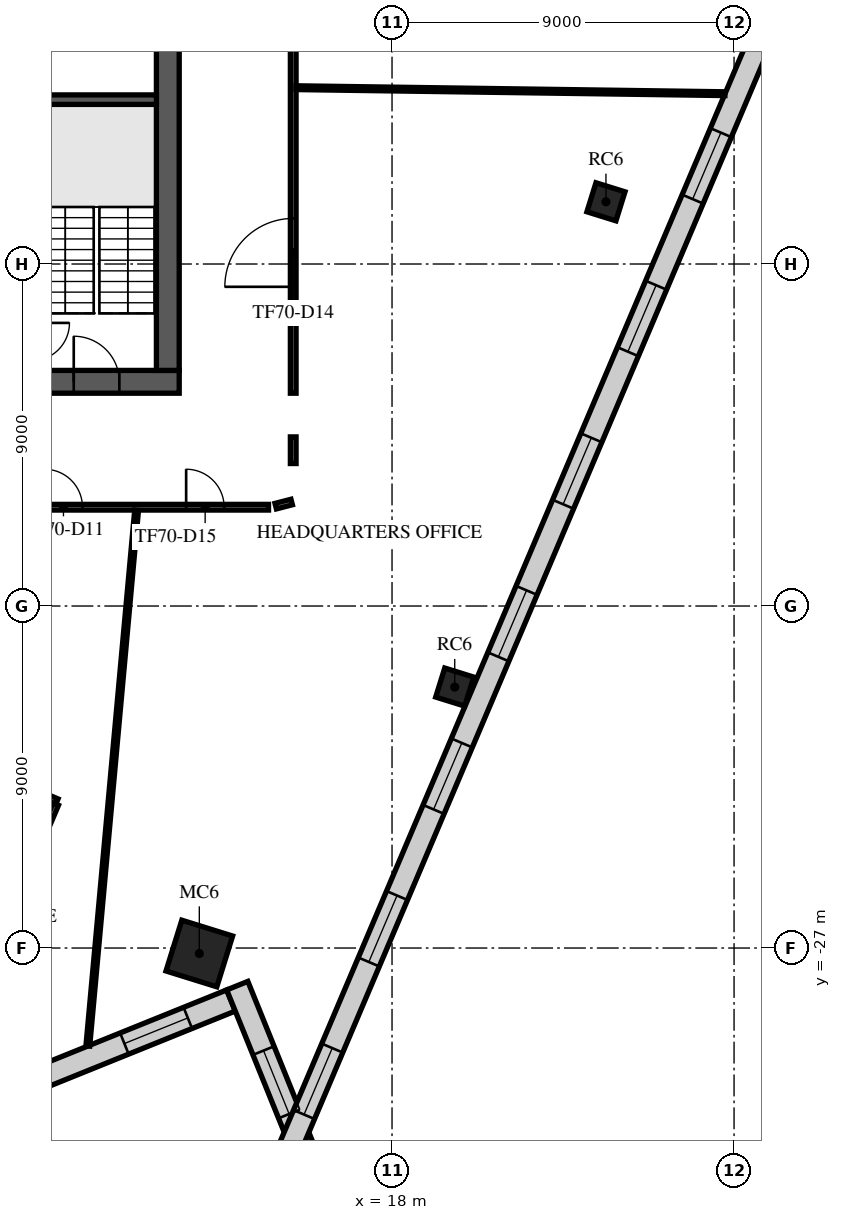
"""IFC4 building model, lengths in metres.
Left out: names, types, materials, properties, quantities, classifications, styles, units other than length and angle.
Written with IfcOpenShell. Run it as: python <this file> out.ifc"""

import sys

from ifc_helpers import new_model, si_unit, direction, frame, frame_2d, origin, origin_2d, place, context, subcontext, project, spatial, rectangle, extrude, element, fill, save


model = new_model("IFC4")
c1 = context("Model", 3, precision=1e-05, world=origin(), true_north=direction((0.0, 1.0)))
c2 = subcontext(c1, "Body", "Model", "MODEL_VIEW")
j1 = project(units=[si_unit("LENGTHUNIT", "METRE"), si_unit("PLANEANGLEUNIT", "RADIAN")], contexts=[c1])
p1 = place(None, origin())
s1 = spatial("IfcSite", under=j1, at=p1, CompositionType="ELEMENT")
p2 = place(p1, origin())
s2 = spatial("IfcBuilding", under=s1, at=p2, CompositionType="ELEMENT")
p3 = place(p2, frame((0.0, 0.0, 296.5)))
s3 = spatial("IfcBuildingStorey", under=s2, at=p3, CompositionType="ELEMENT", Elevation=296.5)
p4 = place(p3, frame((12.929, -27.144, -0.35), z_axis=(0.0, 0.0, 1.0), x_axis=(0.297503182032, 0.954720826567, 0.0)))
e1 = element("IfcColumn", 1, at=p4, inside=s3, PredefinedType="COLUMN", context=c2, shape_type="SweptSolid", body=[
    extrude(rectangle(XDim=1.4, YDim=1.4, at=origin_2d()), origin(), (0.0, 0.0, 1.0), 4.35),
])
for number, where, z_axis, x_axis in (
    (2, (19.65, -20.133, -0.35), (0.0, 0.0, 1.0), (0.298, 0.955, 0.0)),
    (3, (23.629, -7.363, -0.35), (0.0, 0.0, 1.0), (0.298, 0.955, 0.0)),
):
    element("IfcColumn", number, at=place(p3, frame(where, z_axis=z_axis, x_axis=x_axis)), inside=s3, PredefinedType="COLUMN", context=c2, shape_type="SweptSolid", body=[
        extrude(rectangle(XDim=0.8, YDim=0.8, at=origin_2d()), origin(), (0.0, 0.0, 1.0), 4.35),
    ])
p5 = place(p3, frame((-12.4, -12.1, 0.0), z_axis=(0.0, 0.0, 1.0), x_axis=(1.0, 0.0, 0.0)))
e4 = element("IfcWall", 4, at=p5, inside=s3, PredefinedType="SHEAR", context=c2, shape_type="SweptSolid", body=[
    extrude(rectangle(XDim=24.8, YDim=0.6, at=frame_2d((12.4, 0.0))), origin(), (0.0, 0.0, 1.0), 3.65),
])
p6 = place(p5, frame((7.3, 0.0, 0.0)))
e5 = element("IfcOpeningElement", 5, at=p6, cuts=e4, PredefinedType="OPENING", context=c2, shape_type="SweptSolid", body=[
    extrude(rectangle(XDim=2.0, YDim=2.1, at=frame_2d((1.0, 1.05))), frame((0.0, 0.31, 0.0), z_axis=(0.0, -1.0, 0.0), x_axis=(1.0, 0.0, 0.0)), (0.0, 0.0, 1.0), 0.62),
])
p7 = place(p5, frame((17.425, 0.0, 0.0)))
e6 = element("IfcOpeningElement", 6, at=p7, cuts=e4, PredefinedType="OPENING", context=c2, shape_type="SweptSolid", body=[
    extrude(rectangle(XDim=1.2, YDim=2.1, at=frame_2d((0.6, 1.05))), frame((0.0, 0.31, 0.0), z_axis=(0.0, -1.0, 0.0), x_axis=(1.0, 0.0, 0.0)), (0.0, 0.0, 1.0), 0.62),
])
p8 = place(p5, frame((1.575, 0.0, 0.0)))
e7 = element("IfcOpeningElement", 7, at=p8, cuts=e4, PredefinedType="OPENING", context=c2, shape_type="SweptSolid", body=[
    extrude(rectangle(XDim=1.2, YDim=2.1, at=frame_2d((0.6, 1.05))), frame((0.0, 0.31, 0.0), z_axis=(0.0, -1.0, 0.0), x_axis=(1.0, 0.0, 0.0)), (0.0, 0.0, 1.0), 0.62),
])
p9 = place(p5, frame((22.025, 0.0, 0.0)))
e8 = element("IfcOpeningElement", 8, at=p9, cuts=e4, PredefinedType="OPENING", context=c2, shape_type="SweptSolid", body=[
    extrude(rectangle(XDim=1.2, YDim=2.1, at=frame_2d((0.6, 1.05))), frame((0.0, 0.31, 0.0), z_axis=(0.0, -1.0, 0.0), x_axis=(1.0, 0.0, 0.0)), (0.0, 0.0, 1.0), 0.62),
])
p10 = place(p3, frame((12.1, -11.8, 0.0), z_axis=(0.0, 0.0, 1.0), x_axis=(0.0, 1.0, 0.0)))
e9 = element("IfcWall", 9, at=p10, inside=s3, PredefinedType="SHEAR", context=c2, shape_type="SweptSolid", body=[
    extrude(rectangle(XDim=23.6, YDim=0.6, at=frame_2d((11.8, 0.0))), origin(), (0.0, 0.0, 1.0), 3.65),
])
p11 = place(p10, frame((10.6, 0.0, 0.0)))
e10 = element("IfcOpeningElement", 10, at=p11, cuts=e9, PredefinedType="OPENING", context=c2, shape_type="SweptSolid", body=[
    extrude(rectangle(XDim=2.4, YDim=2.4, at=frame_2d((1.2, 1.2))), frame((0.0, 0.31, 0.0), z_axis=(0.0, -1.0, 0.0), x_axis=(1.0, 0.0, 0.0)), (0.0, 0.0, 1.0), 0.62),
])
p12 = place(p3, frame((8.65, -4.675, 0.0), z_axis=(0.0, 0.0, 1.0), x_axis=(1.0, 0.0, 0.0)))
e11 = element("IfcWall", 11, at=p12, inside=s3, PredefinedType="SOLIDWALL", context=c2, shape_type="SweptSolid", body=[
    extrude(rectangle(XDim=3.15, YDim=0.25, at=frame_2d((1.575, 0.0))), origin(), (0.0, 0.0, 1.0), 3.65),
])
p13 = place(p3, frame((5.881, -31.565, 0.0), z_axis=(0.0, 0.0, 1.0), x_axis=(0.927187551636, 0.37459744272, 0.0)))
e12 = element("IfcWall", 12, at=p13, inside=s3, PredefinedType="STANDARD", context=c2, shape_type="SweptSolid", body=[
    extrude(rectangle(XDim=8.5, YDim=0.6, at=frame_2d((4.25, 0.0))), origin(), (0.0, 0.0, 1.0), 3.65),
])
p14 = place(p13, frame((1.225, 0.0, 0.9)))
e13 = element("IfcOpeningElement", 13, at=p14, cuts=e12, PredefinedType="OPENING", context=c2, shape_type="SweptSolid", body=[
    extrude(rectangle(XDim=1.8, YDim=2.1, at=frame_2d((0.9, 1.05))), frame((0.0, 0.31, 0.0), z_axis=(0.0, -1.0, 0.0), x_axis=(1.0, 0.0, 0.0)), (0.0, 0.0, 1.0), 0.62),
])
p15 = place(p13, frame((5.475, 0.0, 0.9)))
e14 = element("IfcOpeningElement", 14, at=p15, cuts=e12, PredefinedType="OPENING", context=c2, shape_type="SweptSolid", body=[
    extrude(rectangle(XDim=1.8, YDim=2.1, at=frame_2d((0.9, 1.05))), frame((0.0, 0.31, 0.0), z_axis=(0.0, -1.0, 0.0), x_axis=(1.0, 0.0, 0.0)), (0.0, 0.0, 1.0), 0.62),
])
p16 = place(p3, frame((13.928, -27.99, 0.0), z_axis=(0.0, 0.0, 1.0), x_axis=(0.374576238335, -0.927196118238, 0.0)))
e15 = element("IfcWall", 15, at=p16, inside=s3, PredefinedType="STANDARD", context=c2, shape_type="SweptSolid", body=[
    extrude(rectangle(XDim=4.886, YDim=0.6, at=frame_2d((2.443, 0.0))), origin(), (0.0, 0.0, 1.0), 3.65),
])
p17 = place(p16, frame((1.843, 0.0, 0.9)))
e16 = element("IfcOpeningElement", 16, at=p17, cuts=e15, PredefinedType="OPENING", context=c2, shape_type="SweptSolid", body=[
    extrude(rectangle(XDim=1.8, YDim=2.1, at=frame_2d((0.9, 1.05))), frame((0.0, 0.31, 0.0), z_axis=(0.0, -1.0, 0.0), x_axis=(1.0, 0.0, 0.0)), (0.0, 0.0, 1.0), 0.62),
])
p18 = place(p3, frame((15.204, -32.515, 0.0), z_axis=(0.0, 0.0, 1.0), x_axis=(0.390728997462, 0.920505758017, 0.0)))
e17 = element("IfcWall", 17, at=p18, inside=s3, PredefinedType="STANDARD", context=c2, shape_type="SweptSolid", body=[
    extrude(rectangle(XDim=47.979, YDim=0.6, at=frame_2d((23.99, 0.0))), origin(), (0.0, 0.0, 1.0), 3.65),
])
p19 = place(p18, frame((1.231, 0.0, 0.9)))
e18 = element("IfcOpeningElement", 18, at=p19, cuts=e17, PredefinedType="OPENING", context=c2, shape_type="SweptSolid", body=[
    extrude(rectangle(XDim=1.9, YDim=2.1, at=frame_2d((0.95, 1.05))), frame((0.0, 0.31, 0.0), z_axis=(0.0, -1.0, 0.0), x_axis=(1.0, 0.0, 0.0)), (0.0, 0.0, 1.0), 0.62),
])
p20 = place(p18, frame((5.593, 0.0, 0.9)))
e19 = element("IfcOpeningElement", 19, at=p20, cuts=e17, PredefinedType="OPENING", context=c2, shape_type="SweptSolid", body=[
    extrude(rectangle(XDim=1.9, YDim=2.1, at=frame_2d((0.95, 1.05))), frame((0.0, 0.31, 0.0), z_axis=(0.0, -1.0, 0.0), x_axis=(1.0, 0.0, 0.0)), (0.0, 0.0, 1.0), 0.62),
])
p21 = place(p18, frame((9.954, 0.0, 0.9)))
e20 = element("IfcOpeningElement", 20, at=p21, cuts=e17, PredefinedType="OPENING", context=c2, shape_type="SweptSolid", body=[
    extrude(rectangle(XDim=1.9, YDim=2.1, at=frame_2d((0.95, 1.05))), frame((0.0, 0.31, 0.0), z_axis=(0.0, -1.0, 0.0), x_axis=(1.0, 0.0, 0.0)), (0.0, 0.0, 1.0), 0.62),
])
p22 = place(p18, frame((14.316, 0.0, 0.9)))
e21 = element("IfcOpeningElement", 21, at=p22, cuts=e17, PredefinedType="OPENING", context=c2, shape_type="SweptSolid", body=[
    extrude(rectangle(XDim=1.9, YDim=2.1, at=frame_2d((0.95, 1.05))), frame((0.0, 0.31, 0.0), z_axis=(0.0, -1.0, 0.0), x_axis=(1.0, 0.0, 0.0)), (0.0, 0.0, 1.0), 0.62),
])
p23 = place(p18, frame((18.678, 0.0, 0.9)))
e22 = element("IfcOpeningElement", 22, at=p23, cuts=e17, PredefinedType="OPENING", context=c2, shape_type="SweptSolid", body=[
    extrude(rectangle(XDim=1.9, YDim=2.1, at=frame_2d((0.95, 1.05))), frame((0.0, 0.31, 0.0), z_axis=(0.0, -1.0, 0.0), x_axis=(1.0, 0.0, 0.0)), (0.0, 0.0, 1.0), 0.62),
])
p24 = place(p18, frame((23.04, 0.0, 0.9)))
e23 = element("IfcOpeningElement", 23, at=p24, cuts=e17, PredefinedType="OPENING", context=c2, shape_type="SweptSolid", body=[
    extrude(rectangle(XDim=1.9, YDim=2.1, at=frame_2d((0.95, 1.05))), frame((0.0, 0.31, 0.0), z_axis=(0.0, -1.0, 0.0), x_axis=(1.0, 0.0, 0.0)), (0.0, 0.0, 1.0), 0.62),
])
p25 = place(p18, frame((27.401, 0.0, 0.9)))
e24 = element("IfcOpeningElement", 24, at=p25, cuts=e17, PredefinedType="OPENING", context=c2, shape_type="SweptSolid", body=[
    extrude(rectangle(XDim=1.9, YDim=2.1, at=frame_2d((0.95, 1.05))), frame((0.0, 0.31, 0.0), z_axis=(0.0, -1.0, 0.0), x_axis=(1.0, 0.0, 0.0)), (0.0, 0.0, 1.0), 0.62),
])
p26 = place(p18, frame((31.763, 0.0, 0.9)))
e25 = element("IfcOpeningElement", 25, at=p26, cuts=e17, PredefinedType="OPENING", context=c2, shape_type="SweptSolid", body=[
    extrude(rectangle(XDim=1.9, YDim=2.1, at=frame_2d((0.95, 1.05))), frame((0.0, 0.31, 0.0), z_axis=(0.0, -1.0, 0.0), x_axis=(1.0, 0.0, 0.0)), (0.0, 0.0, 1.0), 0.62),
])
p27 = place(p18, frame((36.125, 0.0, 0.9)))
e26 = element("IfcOpeningElement", 26, at=p27, cuts=e17, PredefinedType="OPENING", context=c2, shape_type="SweptSolid", body=[
    extrude(rectangle(XDim=1.9, YDim=2.1, at=frame_2d((0.95, 1.05))), frame((0.0, 0.31, 0.0), z_axis=(0.0, -1.0, 0.0), x_axis=(1.0, 0.0, 0.0)), (0.0, 0.0, 1.0), 0.62),
])
p28 = place(p18, frame((40.487, 0.0, 0.9)))
e27 = element("IfcOpeningElement", 27, at=p28, cuts=e17, PredefinedType="OPENING", context=c2, shape_type="SweptSolid", body=[
    extrude(rectangle(XDim=1.9, YDim=2.1, at=frame_2d((0.95, 1.05))), frame((0.0, 0.31, 0.0), z_axis=(0.0, -1.0, 0.0), x_axis=(1.0, 0.0, 0.0)), (0.0, 0.0, 1.0), 0.62),
])
p29 = place(p18, frame((44.848, 0.0, 0.9)))
e28 = element("IfcOpeningElement", 28, at=p29, cuts=e17, PredefinedType="OPENING", context=c2, shape_type="SweptSolid", body=[
    extrude(rectangle(XDim=1.9, YDim=2.1, at=frame_2d((0.95, 1.05))), frame((0.0, 0.31, 0.0), z_axis=(0.0, -1.0, 0.0), x_axis=(1.0, 0.0, 0.0)), (0.0, 0.0, 1.0), 0.62),
])
p30 = place(p3, frame((0.193, -19.329, 0.0), z_axis=(0.0, 0.0, 1.0), x_axis=(0.92050877494, -0.390721889914, 0.0)))
e29 = element("IfcWall", 29, at=p30, inside=s3, PredefinedType="PARTITIONING", context=c2, shape_type="SweptSolid", body=[
    extrude(rectangle(XDim=9.766, YDim=0.15, at=frame_2d((4.883, 0.0))), origin(), (0.0, 0.0, 1.0), 3.25),
])
p31 = place(p3, frame((1.304, -15.4, 0.0), z_axis=(0.0, 0.0, 1.0), x_axis=(1.0, 0.0, 0.0)))
e30 = element("IfcWall", 30, at=p31, inside=s3, PredefinedType="PARTITIONING", context=c2, shape_type="SweptSolid", body=[
    extrude(rectangle(XDim=13.446, YDim=0.15, at=frame_2d((6.723, 0.0))), origin(), (0.0, 0.0, 1.0), 3.25),
])
p32 = place(p31, frame((7.55, 0.0, 0.0)))
e31 = element("IfcOpeningElement", 31, at=p32, cuts=e30, PredefinedType="OPENING", context=c2, shape_type="SweptSolid", body=[
    extrude(rectangle(XDim=1.0, YDim=2.1, at=frame_2d((0.5, 1.05))), frame((0.0, 0.085, 0.0), z_axis=(0.0, -1.0, 0.0), x_axis=(1.0, 0.0, 0.0)), (0.0, 0.0, 1.0), 0.17),
])
p33 = place(p31, frame((11.278, 0.0, 0.0)))
e32 = element("IfcOpeningElement", 32, at=p33, cuts=e30, PredefinedType="OPENING", context=c2, shape_type="SweptSolid", body=[
    extrude(rectangle(XDim=1.0, YDim=2.1, at=frame_2d((0.5, 1.05))), frame((0.0, 0.085, 0.0), z_axis=(0.0, -1.0, 0.0), x_axis=(1.0, 0.0, 0.0)), (0.0, 0.0, 1.0), 0.17),
])
p34 = place(p3, frame((8.274, -25.285, 0.0), z_axis=(0.0, 0.0, 1.0), x_axis=(0.390878666815, 0.920442213194, 0.0)))
e33 = element("IfcWall", 33, at=p34, inside=s3, PredefinedType="PARTITIONING", context=c2, shape_type="SweptSolid", body=[
    extrude(rectangle(XDim=2.25, YDim=0.15, at=frame_2d((1.125, 0.0))), origin(), (0.0, 0.0, 1.0), 3.25),
])
p35 = place(p3, frame((15.36, -15.263, 0.0), z_axis=(0.0, 0.0, 1.0), x_axis=(-0.968229060736, -0.250064963452, 0.0)))
e34 = element("IfcWall", 34, at=p35, inside=s3, PredefinedType="PARTITIONING", context=c2, shape_type="SweptSolid", body=[
    extrude(rectangle(XDim=0.435, YDim=0.15, at=frame_2d((0.217, 0.0))), origin(), (0.0, 0.0, 1.0), 3.25),
])
p36 = place(p3, frame((15.4, -14.25, 0.0), z_axis=(0.0, 0.0, 1.0), x_axis=(0.0, 1.0, 0.0)))
e35 = element("IfcWall", 35, at=p36, inside=s3, PredefinedType="PARTITIONING", context=c2, shape_type="SweptSolid", body=[
    extrude(rectangle(XDim=0.7, YDim=0.15, at=frame_2d((0.35, 0.0))), origin(), (0.0, 0.0, 1.0), 3.65),
])
p37 = place(p3, frame((15.4, -12.4, 0.0), z_axis=(0.0, 0.0, 1.0), x_axis=(0.0, 1.0, 0.0)))
e36 = element("IfcWall", 36, at=p37, inside=s3, PredefinedType="PARTITIONING", context=c2, shape_type="SweptSolid", body=[
    extrude(rectangle(XDim=24.725, YDim=0.15, at=frame_2d((12.362, 0.0))), origin(), (0.0, 0.0, 1.0), 3.25),
])
p38 = place(p37, frame((2.8, 0.0, 0.0)))
e37 = element("IfcOpeningElement", 37, at=p38, cuts=e36, PredefinedType="OPENING", context=c2, shape_type="SweptSolid", body=[
    extrude(rectangle(XDim=1.8, YDim=2.1, at=frame_2d((0.9, 1.05))), frame((0.0, 0.085, 0.0), z_axis=(0.0, -1.0, 0.0), x_axis=(1.0, 0.0, 0.0)), (0.0, 0.0, 1.0), 0.17),
])
p39 = place(p37, frame((10.84, 0.0, 0.0)))
e38 = element("IfcOpeningElement", 38, at=p39, cuts=e36, PredefinedType="OPENING", context=c2, shape_type="SweptSolid", body=[
    extrude(rectangle(XDim=1.8, YDim=2.1, at=frame_2d((0.9, 1.05))), frame((0.0, 0.085, 0.0), z_axis=(0.0, -1.0, 0.0), x_axis=(1.0, 0.0, 0.0)), (0.0, 0.0, 1.0), 0.17),
])
p40 = place(p37, frame((17.59, 0.0, 0.0)))
e39 = element("IfcOpeningElement", 39, at=p40, cuts=e36, PredefinedType="OPENING", context=c2, shape_type="SweptSolid", body=[
    extrude(rectangle(XDim=1.0, YDim=2.1, at=frame_2d((0.5, 1.05))), frame((0.0, 0.085, 0.0), z_axis=(0.0, -1.0, 0.0), x_axis=(1.0, 0.0, 0.0)), (0.0, 0.0, 1.0), 0.17),
])
p41 = place(p37, frame((20.086, 0.0, 0.0)))
e40 = element("IfcOpeningElement", 40, at=p41, cuts=e36, PredefinedType="OPENING", context=c2, shape_type="SweptSolid", body=[
    extrude(rectangle(XDim=1.8, YDim=2.1, at=frame_2d((0.9, 1.05))), frame((0.0, 0.085, 0.0), z_axis=(0.0, -1.0, 0.0), x_axis=(1.0, 0.0, 0.0)), (0.0, 0.0, 1.0), 0.17),
])
p42 = place(p3, frame((9.995, -29.577, 0.0), z_axis=(0.0, 0.0, 1.0), x_axis=(0.090666368484, 0.995881323063, 0.0)))
e41 = element("IfcWall", 41, at=p42, inside=s3, PredefinedType="PARTITIONING", context=c2, shape_type="SweptSolid", body=[
    extrude(rectangle(XDim=14.156, YDim=0.1, at=frame_2d((7.078, 0.0))), origin(), (0.0, 0.0, 1.0), 3.65),
])
p43 = place(p3, frame((15.476, -4.36, 0.0), z_axis=(0.0, 0.0, 1.0), x_axis=(0.999902345391, -0.013974966252, 0.0)))
e42 = element("IfcWall", 42, at=p43, inside=s3, PredefinedType="PARTITIONING", context=c2, shape_type="SweptSolid", body=[
    extrude(rectangle(XDim=11.286, YDim=0.1, at=frame_2d((5.643, 0.0))), origin(), (0.0, 0.0, 1.0), 3.65),
])
p44 = place(p9, origin())
e43 = element("IfcDoor", 43, at=p44, inside=s3, OperationType="SINGLE_SWING_LEFT", PredefinedType="DOOR", context=c2, shape_type="SweptSolid", body=[
    extrude(rectangle(XDim=1.2, YDim=2.1, at=frame_2d((0.6, 1.05))), frame((0.0, 0.025, 0.0), z_axis=(0.0, -1.0, 0.0), x_axis=(1.0, 0.0, 0.0)), (0.0, 0.0, 1.0), 0.05),
])
fill(e8, e43)
p45 = place(p15, origin())
e44 = element("IfcWindow", 44, at=p45, inside=s3, PartitioningType="SINGLE_PANEL", PredefinedType="WINDOW", context=c2, shape_type="SweptSolid", body=[
    extrude(rectangle(XDim=1.8, YDim=2.1, at=frame_2d((0.9, 1.05))), frame((0.0, 0.03, 0.0), z_axis=(0.0, -1.0, 0.0), x_axis=(1.0, 0.0, 0.0)), (0.0, 0.0, 1.0), 0.06),
])
fill(e14, e44)
p46 = place(p17, origin())
e45 = element("IfcWindow", 45, at=p46, inside=s3, PartitioningType="SINGLE_PANEL", PredefinedType="WINDOW", context=c2, shape_type="SweptSolid", body=[
    extrude(rectangle(XDim=1.8, YDim=2.1, at=frame_2d((0.9, 1.05))), frame((0.0, 0.03, 0.0), z_axis=(0.0, -1.0, 0.0), x_axis=(1.0, 0.0, 0.0)), (0.0, 0.0, 1.0), 0.06),
])
fill(e16, e45)
p47 = place(p19, origin())
e46 = element("IfcWindow", 46, at=p47, inside=s3, PartitioningType="SINGLE_PANEL", PredefinedType="WINDOW", context=c2, shape_type="SweptSolid", body=[
    extrude(rectangle(XDim=1.9, YDim=2.1, at=frame_2d((0.95, 1.05))), frame((0.0, 0.03, 0.0), z_axis=(0.0, -1.0, 0.0), x_axis=(1.0, 0.0, 0.0)), (0.0, 0.0, 1.0), 0.06),
])
fill(e18, e46)
p48 = place(p20, origin())
e47 = element("IfcWindow", 47, at=p48, inside=s3, PartitioningType="SINGLE_PANEL", PredefinedType="WINDOW", context=c2, shape_type="SweptSolid", body=[
    extrude(rectangle(XDim=1.9, YDim=2.1, at=frame_2d((0.95, 1.05))), frame((0.0, 0.03, 0.0), z_axis=(0.0, -1.0, 0.0), x_axis=(1.0, 0.0, 0.0)), (0.0, 0.0, 1.0), 0.06),
])
fill(e19, e47)
p49 = place(p21, origin())
e48 = element("IfcWindow", 48, at=p49, inside=s3, PartitioningType="SINGLE_PANEL", PredefinedType="WINDOW", context=c2, shape_type="SweptSolid", body=[
    extrude(rectangle(XDim=1.9, YDim=2.1, at=frame_2d((0.95, 1.05))), frame((0.0, 0.03, 0.0), z_axis=(0.0, -1.0, 0.0), x_axis=(1.0, 0.0, 0.0)), (0.0, 0.0, 1.0), 0.06),
])
fill(e20, e48)
p50 = place(p22, origin())
e49 = element("IfcWindow", 49, at=p50, inside=s3, PartitioningType="SINGLE_PANEL", PredefinedType="WINDOW", context=c2, shape_type="SweptSolid", body=[
    extrude(rectangle(XDim=1.9, YDim=2.1, at=frame_2d((0.95, 1.05))), frame((0.0, 0.03, 0.0), z_axis=(0.0, -1.0, 0.0), x_axis=(1.0, 0.0, 0.0)), (0.0, 0.0, 1.0), 0.06),
])
fill(e21, e49)
p51 = place(p23, origin())
e50 = element("IfcWindow", 50, at=p51, inside=s3, PartitioningType="SINGLE_PANEL", PredefinedType="WINDOW", context=c2, shape_type="SweptSolid", body=[
    extrude(rectangle(XDim=1.9, YDim=2.1, at=frame_2d((0.95, 1.05))), frame((0.0, 0.03, 0.0), z_axis=(0.0, -1.0, 0.0), x_axis=(1.0, 0.0, 0.0)), (0.0, 0.0, 1.0), 0.06),
])
fill(e22, e50)
p52 = place(p24, origin())
e51 = element("IfcWindow", 51, at=p52, inside=s3, PartitioningType="SINGLE_PANEL", PredefinedType="WINDOW", context=c2, shape_type="SweptSolid", body=[
    extrude(rectangle(XDim=1.9, YDim=2.1, at=frame_2d((0.95, 1.05))), frame((0.0, 0.03, 0.0), z_axis=(0.0, -1.0, 0.0), x_axis=(1.0, 0.0, 0.0)), (0.0, 0.0, 1.0), 0.06),
])
fill(e23, e51)
p53 = place(p25, origin())
e52 = element("IfcWindow", 52, at=p53, inside=s3, PartitioningType="SINGLE_PANEL", PredefinedType="WINDOW", context=c2, shape_type="SweptSolid", body=[
    extrude(rectangle(XDim=1.9, YDim=2.1, at=frame_2d((0.95, 1.05))), frame((0.0, 0.03, 0.0), z_axis=(0.0, -1.0, 0.0), x_axis=(1.0, 0.0, 0.0)), (0.0, 0.0, 1.0), 0.06),
])
fill(e24, e52)
p54 = place(p32, frame((1.0, 0.0, 0.0), z_axis=(0.0, 0.0, 1.0), x_axis=(-1.0, 0.0, 0.0)))
e53 = element("IfcDoor", 53, at=p54, inside=s3, OperationType="SINGLE_SWING_RIGHT", PredefinedType="DOOR", context=c2, shape_type="SweptSolid", body=[
    extrude(rectangle(XDim=1.0, YDim=2.1, at=frame_2d((0.5, 1.05))), frame((0.0, 0.025, 0.0), z_axis=(0.0, -1.0, 0.0), x_axis=(1.0, 0.0, 0.0)), (0.0, 0.0, 1.0), 0.05),
])
fill(e31, e53)
p55 = place(p38, frame((1.8, 0.0, 0.0), z_axis=(0.0, 0.0, 1.0), x_axis=(-1.0, 0.0, 0.0)))
e54 = element("IfcDoor", 54, at=p55, inside=s3, OperationType="DOUBLE_DOOR_SINGLE_SWING", PredefinedType="DOOR", context=c2, shape_type="SweptSolid", body=[
    extrude(rectangle(XDim=1.8, YDim=2.1, at=frame_2d((0.9, 1.05))), frame((0.0, 0.025, 0.0), z_axis=(0.0, -1.0, 0.0), x_axis=(1.0, 0.0, 0.0)), (0.0, 0.0, 1.0), 0.05),
])
fill(e37, e54)
p56 = place(p33, frame((1.0, 0.0, 0.0), z_axis=(0.0, 0.0, 1.0), x_axis=(-1.0, 0.0, 0.0)))
e55 = element("IfcDoor", 55, at=p56, inside=s3, OperationType="SINGLE_SWING_RIGHT", PredefinedType="DOOR", context=c2, shape_type="SweptSolid", body=[
    extrude(rectangle(XDim=1.0, YDim=2.1, at=frame_2d((0.5, 1.05))), frame((0.0, 0.025, 0.0), z_axis=(0.0, -1.0, 0.0), x_axis=(1.0, 0.0, 0.0)), (0.0, 0.0, 1.0), 0.05),
])
fill(e32, e55)
save(model, sys.argv[1])
